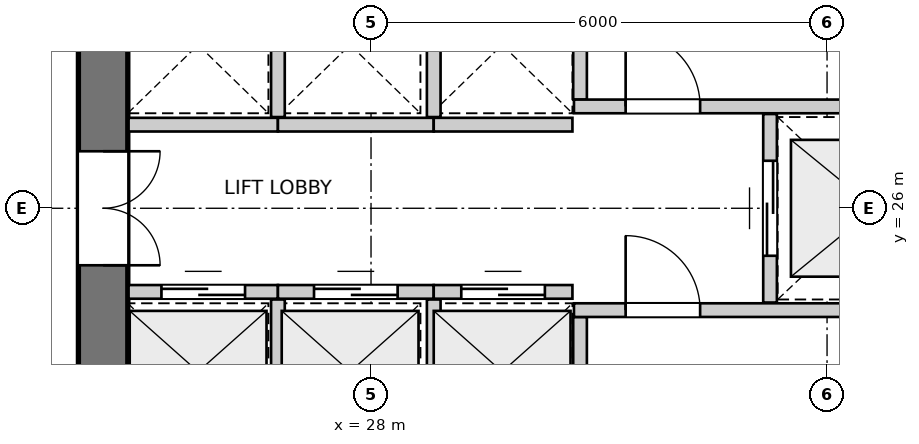
"""IFC4 building model, lengths in metres.
Left out: names, types, materials, properties, quantities, classifications, styles, units other than length and angle.
Written with IfcOpenShell. Run it as: python <this file> out.ifc"""

import sys

from ifc_helpers import new_model, si_unit, direction, frame, frame_2d, origin, place, context, subcontext, project, spatial, rectangle, extrude, source, transform, mapped, element, fill, save


model = new_model("IFC4")
c1 = context("Model", 3, precision=1e-05, world=origin(), true_north=direction((0.0, 1.0)))
c2 = subcontext(c1, "Body", "Model", "MODEL_VIEW")
j1 = project(units=[si_unit("LENGTHUNIT", "METRE"), si_unit("PLANEANGLEUNIT", "RADIAN")], contexts=[c1])
p1 = place(None, origin())
s1 = spatial("IfcSite", under=j1, at=p1, CompositionType="ELEMENT")
p2 = place(p1, origin())
s2 = spatial("IfcBuilding", under=s1, at=p2, CompositionType="ELEMENT")
p3 = place(p2, frame((0.0, 0.0, 92.8)))
s3 = spatial("IfcBuildingStorey", under=s2, at=p3, CompositionType="ELEMENT", Elevation=92.8)
p4 = place(p3, frame((24.475, 33.8, 0.0), z_axis=(0.0, 0.0, 1.0), x_axis=(0.0, -1.0, 0.0)))
e1 = element("IfcWall", 1, at=p4, inside=s3, PredefinedType="SHEAR", context=c2, shape_type="SweptSolid", body=[
    extrude(rectangle(XDim=15.6, YDim=0.65, at=frame_2d((7.8, 0.0))), origin(), (0.0, 0.0, 1.0), 2.95),
])
p5 = place(p4, frame((7.05, 0.0, 0.0)))
e2 = element("IfcOpeningElement", 2, at=p5, cuts=e1, PredefinedType="OPENING", context=c2, shape_type="SweptSolid", body=[
    extrude(rectangle(XDim=1.5, YDim=2.15, at=frame_2d((0.75, 1.075))), frame((0.0, 0.335, 0.0), z_axis=(0.0, -1.0, 0.0), x_axis=(1.0, 0.0, 0.0)), (0.0, 0.0, 1.0), 0.67),
])
p6 = place(p4, frame((3.52, 0.0, 0.0)))
e3 = element("IfcOpeningElement", 3, at=p6, cuts=e1, PredefinedType="OPENING", context=c2, shape_type="SweptSolid", body=[
    extrude(rectangle(XDim=0.86, YDim=2.05, at=frame_2d((0.43, 1.025))), frame((0.0, 0.335, 0.0), z_axis=(0.0, -1.0, 0.0), x_axis=(1.0, 0.0, 0.0)), (0.0, 0.0, 1.0), 0.67),
])
p7 = place(p4, frame((11.22, 0.0, 0.0)))
e4 = element("IfcOpeningElement", 4, at=p7, cuts=e1, PredefinedType="OPENING", context=c2, shape_type="SweptSolid", body=[
    extrude(rectangle(XDim=0.86, YDim=2.05, at=frame_2d((0.43, 1.025))), frame((0.0, 0.335, 0.0), z_axis=(0.0, -1.0, 0.0), x_axis=(1.0, 0.0, 0.0)), (0.0, 0.0, 1.0), 0.67),
])
p8 = place(p3, frame((30.75, 21.46, 0.0), z_axis=(0.0, 0.0, 1.0), x_axis=(0.0, 1.0, 0.0)))
e5 = element("IfcWall", 5, at=p8, inside=s3, PredefinedType="PARTITIONING", context=c2, shape_type="SweptSolid", body=[
    extrude(rectangle(XDim=3.11, YDim=0.18, at=frame_2d((1.555, 0.0))), origin(), (0.0, 0.0, 1.0), 2.95),
])
p9 = place(p8, frame((0.26, 0.0, 0.0)))
e6 = element("IfcOpeningElement", 6, at=p9, cuts=e5, PredefinedType="OPENING", context=c2, shape_type="SweptSolid", body=[
    extrude(rectangle(XDim=0.86, YDim=2.05, at=frame_2d((0.43, 1.025))), frame((0.0, 0.1, 0.0), z_axis=(0.0, -1.0, 0.0), x_axis=(1.0, 0.0, 0.0)), (0.0, 0.0, 1.0), 0.2),
])
p10 = place(p3, frame((30.67, 24.66, 0.0), z_axis=(0.0, 0.0, 1.0), x_axis=(1.0, 0.0, 0.0)))
e7 = element("IfcWall", 7, at=p10, inside=s3, PredefinedType="PARTITIONING", context=c2, shape_type="SweptSolid", body=[
    extrude(rectangle(XDim=5.22, YDim=0.18, at=frame_2d((2.61, 0.0))), origin(), (0.0, 0.0, 1.0), 2.95),
])
p11 = place(p10, frame((0.68, 0.0, 0.0)))
e8 = element("IfcOpeningElement", 8, at=p11, cuts=e7, PredefinedType="OPENING", context=c2, shape_type="SweptSolid", body=[
    extrude(rectangle(XDim=0.98, YDim=2.15, at=frame_2d((0.49, 1.075))), frame((0.0, 0.1, 0.0), z_axis=(0.0, -1.0, 0.0), x_axis=(1.0, 0.0, 0.0)), (0.0, 0.0, 1.0), 0.2),
])
p12 = place(p3, frame((30.75, 27.43, 0.0), z_axis=(0.0, 0.0, 1.0), x_axis=(0.0, 1.0, 0.0)))
e9 = element("IfcWall", 9, at=p12, inside=s3, PredefinedType="PARTITIONING", context=c2, shape_type="SweptSolid", body=[
    extrude(rectangle(XDim=3.11, YDim=0.18, at=frame_2d((1.555, 0.0))), origin(), (0.0, 0.0, 1.0), 2.95),
])
p13 = place(p12, frame((1.98, 0.0, 0.0)))
e10 = element("IfcOpeningElement", 10, at=p13, cuts=e9, PredefinedType="OPENING", context=c2, shape_type="SweptSolid", body=[
    extrude(rectangle(XDim=0.86, YDim=2.05, at=frame_2d((0.43, 1.025))), frame((0.0, 0.1, 0.0), z_axis=(0.0, -1.0, 0.0), x_axis=(1.0, 0.0, 0.0)), (0.0, 0.0, 1.0), 0.2),
])
p14 = place(p3, frame((30.67, 27.34, 0.0), z_axis=(0.0, 0.0, 1.0), x_axis=(1.0, 0.0, 0.0)))
e11 = element("IfcWall", 11, at=p14, inside=s3, PredefinedType="PARTITIONING", context=c2, shape_type="SweptSolid", body=[
    extrude(rectangle(XDim=5.22, YDim=0.18, at=frame_2d((2.61, 0.0))), origin(), (0.0, 0.0, 1.0), 2.95),
])
p15 = place(p14, frame((0.68, 0.0, 0.0)))
e12 = element("IfcOpeningElement", 12, at=p15, cuts=e11, PredefinedType="OPENING", context=c2, shape_type="SweptSolid", body=[
    extrude(rectangle(XDim=0.98, YDim=2.15, at=frame_2d((0.49, 1.075))), frame((0.0, 0.1, 0.0), z_axis=(0.0, -1.0, 0.0), x_axis=(1.0, 0.0, 0.0)), (0.0, 0.0, 1.0), 0.2),
])
p16 = place(p3, frame((33.25, 24.76, 0.0), z_axis=(0.0, 0.0, 1.0), x_axis=(0.0, 1.0, 0.0)))
e13 = element("IfcWall", 13, at=p16, inside=s3, PredefinedType="PARTITIONING", context=c2, shape_type="SweptSolid", body=[
    extrude(rectangle(XDim=2.48, YDim=0.18, at=frame_2d((1.24, 0.0))), origin(), (0.0, 0.0, 1.0), 2.95),
])
p17 = place(p16, frame((0.615, 0.0, 0.0)))
e14 = element("IfcOpeningElement", 14, at=p17, cuts=e13, PredefinedType="OPENING", context=c2, shape_type="SweptSolid", body=[
    extrude(rectangle(XDim=1.25, YDim=2.15, at=frame_2d((0.625, 1.075))), frame((0.0, 0.1, 0.0), z_axis=(0.0, -1.0, 0.0), x_axis=(1.0, 0.0, 0.0)), (0.0, 0.0, 1.0), 0.2),
])
p18 = place(p3, frame((24.81, 24.9, 0.0), z_axis=(0.0, 0.0, 1.0), x_axis=(1.0, 0.0, 0.0)))
e15 = element("IfcWall", 15, at=p18, inside=s3, PredefinedType="PARTITIONING", context=c2, shape_type="SweptSolid", body=[
    extrude(rectangle(XDim=1.965, YDim=0.18, at=frame_2d((0.982, 0.0))), origin(), (0.0, 0.0, 1.0), 2.95),
])
p19 = place(p18, frame((0.433, 0.0, 0.0)))
e16 = element("IfcOpeningElement", 16, at=p19, cuts=e15, PredefinedType="OPENING", context=c2, shape_type="SweptSolid", body=[
    extrude(rectangle(XDim=1.1, YDim=2.15, at=frame_2d((0.55, 1.075))), frame((0.0, 0.1, 0.0), z_axis=(0.0, -1.0, 0.0), x_axis=(1.0, 0.0, 0.0)), (0.0, 0.0, 1.0), 0.2),
])
p20 = place(p3, frame((26.775, 24.9, 0.0), z_axis=(0.0, 0.0, 1.0), x_axis=(1.0, 0.0, 0.0)))
e17 = element("IfcWall", 17, at=p20, inside=s3, PredefinedType="PARTITIONING", context=c2, shape_type="SweptSolid", body=[
    extrude(rectangle(XDim=2.05, YDim=0.18, at=frame_2d((1.025, 0.0))), origin(), (0.0, 0.0, 1.0), 2.95),
])
p21 = place(p20, frame((0.475, 0.0, 0.0)))
e18 = element("IfcOpeningElement", 18, at=p21, cuts=e17, PredefinedType="OPENING", context=c2, shape_type="SweptSolid", body=[
    extrude(rectangle(XDim=1.1, YDim=2.15, at=frame_2d((0.55, 1.075))), frame((0.0, 0.1, 0.0), z_axis=(0.0, -1.0, 0.0), x_axis=(1.0, 0.0, 0.0)), (0.0, 0.0, 1.0), 0.2),
])
p22 = place(p3, frame((26.775, 23.02, 0.0), z_axis=(0.0, 0.0, 1.0), x_axis=(0.0, 1.0, 0.0)))
e19 = element("IfcWall", 19, at=p22, inside=s3, PredefinedType="PARTITIONING", context=c2, shape_type="SweptSolid", body=[
    extrude(rectangle(XDim=1.78, YDim=0.18, at=frame_2d((0.89, 0.0))), origin(), (0.0, 0.0, 1.0), 2.95),
])
p23 = place(p3, frame((28.825, 24.9, 0.0), z_axis=(0.0, 0.0, 1.0), x_axis=(1.0, 0.0, 0.0)))
e20 = element("IfcWall", 20, at=p23, inside=s3, PredefinedType="PARTITIONING", context=c2, shape_type="SweptSolid", body=[
    extrude(rectangle(XDim=1.825, YDim=0.18, at=frame_2d((0.913, 0.0))), origin(), (0.0, 0.0, 1.0), 2.95),
])
p24 = place(p23, frame((0.363, 0.0, 0.0)))
e21 = element("IfcOpeningElement", 21, at=p24, cuts=e20, PredefinedType="OPENING", context=c2, shape_type="SweptSolid", body=[
    extrude(rectangle(XDim=1.1, YDim=2.15, at=frame_2d((0.55, 1.075))), frame((0.0, 0.1, 0.0), z_axis=(0.0, -1.0, 0.0), x_axis=(1.0, 0.0, 0.0)), (0.0, 0.0, 1.0), 0.2),
])
p25 = place(p3, frame((28.825, 23.02, 0.0), z_axis=(0.0, 0.0, 1.0), x_axis=(0.0, 1.0, 0.0)))
e22 = element("IfcWall", 22, at=p25, inside=s3, PredefinedType="PARTITIONING", context=c2, shape_type="SweptSolid", body=[
    extrude(rectangle(XDim=1.78, YDim=0.18, at=frame_2d((0.89, 0.0))), origin(), (0.0, 0.0, 1.0), 2.95),
])
p26 = place(p3, frame((24.81, 27.1, 0.0), z_axis=(0.0, 0.0, 1.0), x_axis=(1.0, 0.0, 0.0)))
e23 = element("IfcWall", 23, at=p26, inside=s3, PredefinedType="PARTITIONING", context=c2, shape_type="SweptSolid", body=[
    extrude(rectangle(XDim=1.965, YDim=0.18, at=frame_2d((0.982, 0.0))), origin(), (0.0, 0.0, 1.0), 2.95),
])
p27 = place(p3, frame((26.775, 27.1, 0.0), z_axis=(0.0, 0.0, 1.0), x_axis=(1.0, 0.0, 0.0)))
e24 = element("IfcWall", 24, at=p27, inside=s3, PredefinedType="PARTITIONING", context=c2, shape_type="SweptSolid", body=[
    extrude(rectangle(XDim=2.05, YDim=0.18, at=frame_2d((1.025, 0.0))), origin(), (0.0, 0.0, 1.0), 2.95),
])
p28 = place(p3, frame((26.775, 27.2, 0.0), z_axis=(0.0, 0.0, 1.0), x_axis=(0.0, 1.0, 0.0)))
e25 = element("IfcWall", 25, at=p28, inside=s3, PredefinedType="PARTITIONING", context=c2, shape_type="SweptSolid", body=[
    extrude(rectangle(XDim=1.78, YDim=0.18, at=frame_2d((0.89, 0.0))), origin(), (0.0, 0.0, 1.0), 2.95),
])
p29 = place(p3, frame((28.825, 27.1, 0.0), z_axis=(0.0, 0.0, 1.0), x_axis=(1.0, 0.0, 0.0)))
e26 = element("IfcWall", 26, at=p29, inside=s3, PredefinedType="PARTITIONING", context=c2, shape_type="SweptSolid", body=[
    extrude(rectangle(XDim=1.825, YDim=0.18, at=frame_2d((0.913, 0.0))), origin(), (0.0, 0.0, 1.0), 2.95),
])
p30 = place(p3, frame((28.825, 27.2, 0.0), z_axis=(0.0, 0.0, 1.0), x_axis=(0.0, 1.0, 0.0)))
e27 = element("IfcWall", 27, at=p30, inside=s3, PredefinedType="PARTITIONING", context=c2, shape_type="SweptSolid", body=[
    extrude(rectangle(XDim=1.78, YDim=0.18, at=frame_2d((0.89, 0.0))), origin(), (0.0, 0.0, 1.0), 2.95),
])
m1 = source(origin(), c2, "Body", "SweptSolid", [
    extrude(rectangle(XDim=1.5, YDim=2.15, at=frame_2d((0.75, 1.075))), frame((0.0, 0.025, 0.0), z_axis=(0.0, -1.0, 0.0), x_axis=(1.0, 0.0, 0.0)), (0.0, 0.0, 1.0), 0.05),
])
p31 = place(p5, origin())
e28 = element("IfcDoor", 28, at=p31, inside=s3, OperationType="DOUBLE_DOOR_SINGLE_SWING", PredefinedType="DOOR", context=c2, shape_type="MappedRepresentation", body=[
    mapped(m1, transform((0.0, 0.0, 0.0), x_axis=(1.0, 0.0, 0.0), y_axis=(0.0, 1.0, 0.0), z_axis=(0.0, 0.0, 1.0), scale=1.0)),
])
fill(e2, e28)
m2 = source(origin(), c2, "Body", "SweptSolid", [
    extrude(rectangle(XDim=0.98, YDim=2.15, at=frame_2d((0.49, 1.075))), frame((0.0, 0.025, 0.0), z_axis=(0.0, -1.0, 0.0), x_axis=(1.0, 0.0, 0.0)), (0.0, 0.0, 1.0), 0.05),
])
p32 = place(p11, origin())
e29 = element("IfcDoor", 29, at=p32, inside=s3, OperationType="SINGLE_SWING_LEFT", PredefinedType="DOOR", context=c2, shape_type="MappedRepresentation", body=[
    mapped(m2, transform((0.0, 0.0, 0.0), x_axis=(1.0, 0.0, 0.0), y_axis=(0.0, 1.0, 0.0), z_axis=(0.0, 0.0, 1.0), scale=1.0)),
])
fill(e8, e29)
p33 = place(p15, origin())
e30 = element("IfcDoor", 30, at=p33, inside=s3, OperationType="SINGLE_SWING_LEFT", PredefinedType="DOOR", context=c2, shape_type="MappedRepresentation", body=[
    mapped(m2, transform((0.0, 0.0, 0.0), x_axis=(1.0, 0.0, 0.0), y_axis=(0.0, 1.0, 0.0), z_axis=(0.0, 0.0, 1.0), scale=1.0)),
])
fill(e12, e30)
m3 = source(origin(), c2, "Body", "SweptSolid", [
    extrude(rectangle(XDim=1.25, YDim=2.15, at=frame_2d((0.625, 1.075))), frame((0.0, 0.025, 0.0), z_axis=(0.0, -1.0, 0.0), x_axis=(1.0, 0.0, 0.0)), (0.0, 0.0, 1.0), 0.05),
])
p34 = place(p17, origin())
e31 = element("IfcDoor", 31, at=p34, inside=s3, OperationType="DOUBLE_DOOR_SLIDING", PredefinedType="DOOR", context=c2, shape_type="MappedRepresentation", body=[
    mapped(m3, transform((0.0, 0.0, 0.0), x_axis=(1.0, 0.0, 0.0), y_axis=(0.0, 1.0, 0.0), z_axis=(0.0, 0.0, 1.0), scale=1.0)),
])
fill(e14, e31)
m4 = source(origin(), c2, "Body", "SweptSolid", [
    extrude(rectangle(XDim=1.1, YDim=2.15, at=frame_2d((0.55, 1.075))), frame((0.0, 0.025, 0.0), z_axis=(0.0, -1.0, 0.0), x_axis=(1.0, 0.0, 0.0)), (0.0, 0.0, 1.0), 0.05),
])
p35 = place(p19, origin())
e32 = element("IfcDoor", 32, at=p35, inside=s3, OperationType="DOUBLE_DOOR_SLIDING", PredefinedType="DOOR", context=c2, shape_type="MappedRepresentation", body=[
    mapped(m4, transform((0.0, 0.0, 0.0), x_axis=(1.0, 0.0, 0.0), y_axis=(0.0, 1.0, 0.0), z_axis=(0.0, 0.0, 1.0), scale=1.0)),
])
fill(e16, e32)
p36 = place(p21, origin())
e33 = element("IfcDoor", 33, at=p36, inside=s3, OperationType="DOUBLE_DOOR_SLIDING", PredefinedType="DOOR", context=c2, shape_type="MappedRepresentation", body=[
    mapped(m4, transform((0.0, 0.0, 0.0), x_axis=(1.0, 0.0, 0.0), y_axis=(0.0, 1.0, 0.0), z_axis=(0.0, 0.0, 1.0), scale=1.0)),
])
fill(e18, e33)
p37 = place(p24, origin())
e34 = element("IfcDoor", 34, at=p37, inside=s3, OperationType="DOUBLE_DOOR_SLIDING", PredefinedType="DOOR", context=c2, shape_type="MappedRepresentation", body=[
    mapped(m4, transform((0.0, 0.0, 0.0), x_axis=(1.0, 0.0, 0.0), y_axis=(0.0, 1.0, 0.0), z_axis=(0.0, 0.0, 1.0), scale=1.0)),
])
fill(e21, e34)
save(model, sys.argv[1])
